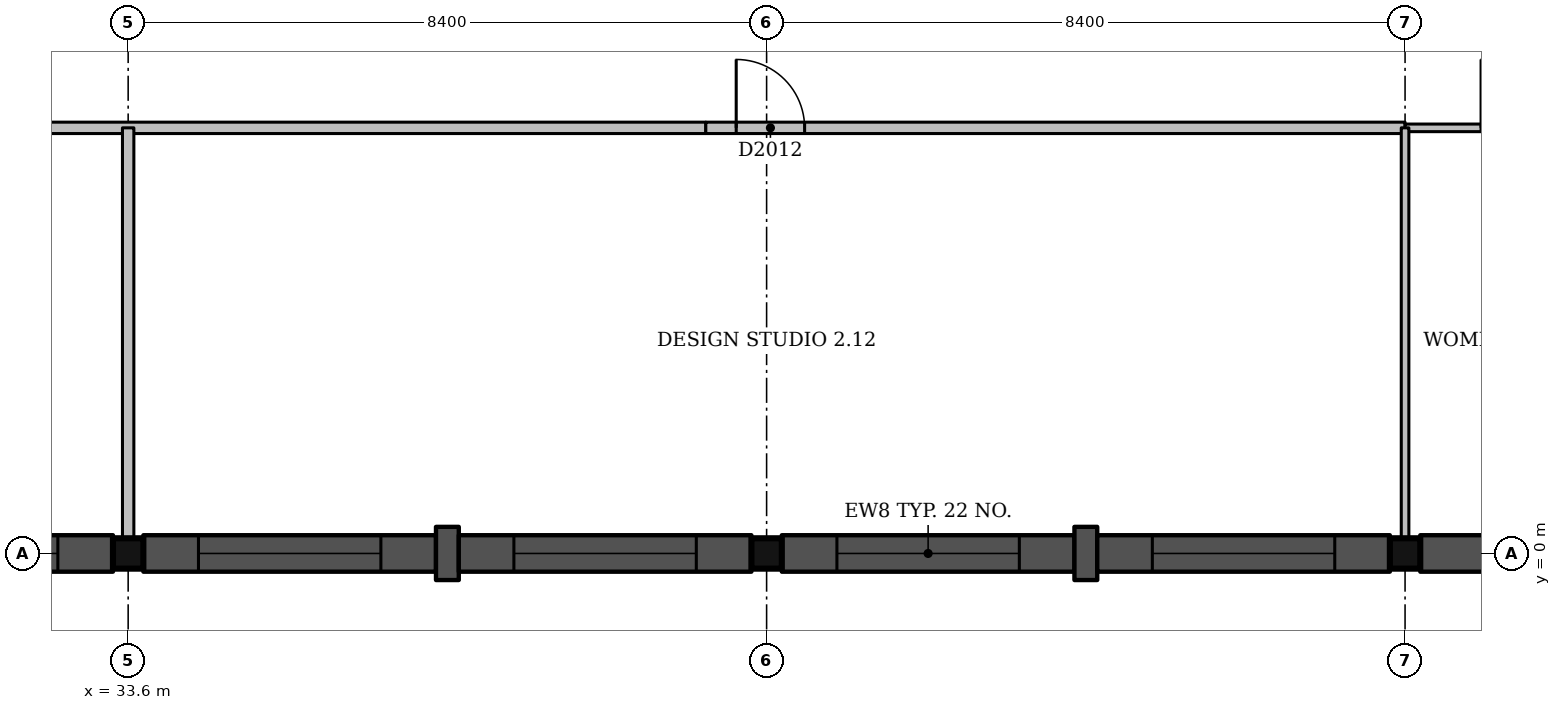
"""IFC4 building model, lengths in metres.
Left out: names, types, materials, properties, quantities, classifications, styles, units other than length and angle.
Written with IfcOpenShell. Run it as: python <this file> out.ifc"""

import sys

from ifc_helpers import new_model, si_unit, direction, frame, frame_2d, origin, origin_2d, place, context, subcontext, project, spatial, rectangle, extrude, element, fill, save


model = new_model("IFC4")
c1 = context("Model", 3, precision=1e-05, world=origin(), true_north=direction((0.0, 1.0)))
c2 = subcontext(c1, "Body", "Model", "MODEL_VIEW")
j1 = project(units=[si_unit("LENGTHUNIT", "METRE"), si_unit("PLANEANGLEUNIT", "RADIAN")], contexts=[c1])
p1 = place(None, origin())
s1 = spatial("IfcSite", under=j1, at=p1, CompositionType="ELEMENT")
p2 = place(p1, origin())
s2 = spatial("IfcBuilding", under=s1, at=p2, CompositionType="ELEMENT")
p3 = place(p2, frame((0.0, 0.0, 9.0)))
s3 = spatial("IfcBuildingStorey", under=s2, at=p3, CompositionType="ELEMENT", Elevation=9.0)
for number, where, z_axis, x_axis in (
    (1, (33.6, 0.0, 0.0), (0.0, 0.0, 1.0), (1.0, 0.0, 0.0)),
    (2, (42.0, 0.0, 0.0), (0.0, 0.0, 1.0), (1.0, 0.0, 0.0)),
    (3, (50.4, 0.0, 0.0), (0.0, 0.0, 1.0), (1.0, 0.0, 0.0)),
):
    element("IfcColumn", number, at=place(p3, frame(where, z_axis=z_axis, x_axis=x_axis)), inside=s3, PredefinedType="COLUMN", context=c2, shape_type="SweptSolid", body=[
        extrude(rectangle(XDim=0.4, YDim=0.4, at=origin_2d()), origin(), (0.0, 0.0, 1.0), 4.5),
    ])
p4 = place(p3, frame((29.55, 0.0, 0.0), z_axis=(0.0, 0.0, 1.0), x_axis=(1.0, 0.0, 0.0)))
e4 = element("IfcWall", 4, at=p4, inside=s3, PredefinedType="SOLIDWALL", context=c2, shape_type="SweptSolid", body=[
    extrude(rectangle(XDim=3.85, YDim=0.48, at=frame_2d((1.925, 0.0))), origin(), (0.0, 0.0, 1.0), 3.6),
])
p5 = place(p4, frame((0.725, 0.0, 2.4)))
e5 = element("IfcOpeningElement", 5, at=p5, cuts=e4, PredefinedType="OPENING", context=c2, shape_type="SweptSolid", body=[
    extrude(rectangle(XDim=2.4, YDim=0.6, at=frame_2d((1.2, 0.3))), frame((0.0, 0.25, 0.0), z_axis=(0.0, -1.0, 0.0), x_axis=(1.0, 0.0, 0.0)), (0.0, 0.0, 1.0), 0.5),
])
p6 = place(p3, frame((33.8, 0.0, 0.0), z_axis=(0.0, 0.0, 1.0), x_axis=(1.0, 0.0, 0.0)))
e6 = element("IfcWall", 6, at=p6, inside=s3, PredefinedType="SOLIDWALL", context=c2, shape_type="SweptSolid", body=[
    extrude(rectangle(XDim=3.85, YDim=0.48, at=frame_2d((1.925, 0.0))), origin(), (0.0, 0.0, 1.0), 3.6),
])
p7 = place(p6, frame((0.725, 0.0, 2.4)))
e7 = element("IfcOpeningElement", 7, at=p7, cuts=e6, PredefinedType="OPENING", context=c2, shape_type="SweptSolid", body=[
    extrude(rectangle(XDim=2.4, YDim=0.6, at=frame_2d((1.2, 0.3))), frame((0.0, 0.25, 0.0), z_axis=(0.0, -1.0, 0.0), x_axis=(1.0, 0.0, 0.0)), (0.0, 0.0, 1.0), 0.5),
])
p8 = place(p3, frame((37.65, 0.0, 0.0), z_axis=(0.0, 0.0, 1.0), x_axis=(1.0, 0.0, 0.0)))
e8 = element("IfcWall", 8, at=p8, inside=s3, PredefinedType="SOLIDWALL", context=c2, shape_type="SweptSolid", body=[
    extrude(rectangle(XDim=0.3, YDim=0.7, at=frame_2d((0.15, 0.0))), origin(), (0.0, 0.0, 1.0), 3.6),
])
p9 = place(p3, frame((37.95, 0.0, 0.0), z_axis=(0.0, 0.0, 1.0), x_axis=(1.0, 0.0, 0.0)))
e9 = element("IfcWall", 9, at=p9, inside=s3, PredefinedType="SOLIDWALL", context=c2, shape_type="SweptSolid", body=[
    extrude(rectangle(XDim=3.85, YDim=0.48, at=frame_2d((1.925, 0.0))), origin(), (0.0, 0.0, 1.0), 3.6),
])
p10 = place(p9, frame((0.725, 0.0, 2.4)))
e10 = element("IfcOpeningElement", 10, at=p10, cuts=e9, PredefinedType="OPENING", context=c2, shape_type="SweptSolid", body=[
    extrude(rectangle(XDim=2.4, YDim=0.6, at=frame_2d((1.2, 0.3))), frame((0.0, 0.25, 0.0), z_axis=(0.0, -1.0, 0.0), x_axis=(1.0, 0.0, 0.0)), (0.0, 0.0, 1.0), 0.5),
])
p11 = place(p3, frame((42.2, 0.0, 0.0), z_axis=(0.0, 0.0, 1.0), x_axis=(1.0, 0.0, 0.0)))
e11 = element("IfcWall", 11, at=p11, inside=s3, PredefinedType="SOLIDWALL", context=c2, shape_type="SweptSolid", body=[
    extrude(rectangle(XDim=3.85, YDim=0.48, at=frame_2d((1.925, 0.0))), origin(), (0.0, 0.0, 1.0), 3.6),
])
p12 = place(p11, frame((0.725, 0.0, 2.4)))
e12 = element("IfcOpeningElement", 12, at=p12, cuts=e11, PredefinedType="OPENING", context=c2, shape_type="SweptSolid", body=[
    extrude(rectangle(XDim=2.4, YDim=0.6, at=frame_2d((1.2, 0.3))), frame((0.0, 0.25, 0.0), z_axis=(0.0, -1.0, 0.0), x_axis=(1.0, 0.0, 0.0)), (0.0, 0.0, 1.0), 0.5),
])
p13 = place(p3, frame((46.05, 0.0, 0.0), z_axis=(0.0, 0.0, 1.0), x_axis=(1.0, 0.0, 0.0)))
e13 = element("IfcWall", 13, at=p13, inside=s3, PredefinedType="SOLIDWALL", context=c2, shape_type="SweptSolid", body=[
    extrude(rectangle(XDim=0.3, YDim=0.7, at=frame_2d((0.15, 0.0))), origin(), (0.0, 0.0, 1.0), 3.6),
])
p14 = place(p3, frame((46.35, 0.0, 0.0), z_axis=(0.0, 0.0, 1.0), x_axis=(1.0, 0.0, 0.0)))
e14 = element("IfcWall", 14, at=p14, inside=s3, PredefinedType="SOLIDWALL", context=c2, shape_type="SweptSolid", body=[
    extrude(rectangle(XDim=3.85, YDim=0.48, at=frame_2d((1.925, 0.0))), origin(), (0.0, 0.0, 1.0), 3.6),
])
p15 = place(p14, frame((0.725, 0.0, 2.4)))
e15 = element("IfcOpeningElement", 15, at=p15, cuts=e14, PredefinedType="OPENING", context=c2, shape_type="SweptSolid", body=[
    extrude(rectangle(XDim=2.4, YDim=0.6, at=frame_2d((1.2, 0.3))), frame((0.0, 0.25, 0.0), z_axis=(0.0, -1.0, 0.0), x_axis=(1.0, 0.0, 0.0)), (0.0, 0.0, 1.0), 0.5),
])
p16 = place(p3, frame((50.6, 0.0, 0.0), z_axis=(0.0, 0.0, 1.0), x_axis=(1.0, 0.0, 0.0)))
e16 = element("IfcWall", 16, at=p16, inside=s3, PredefinedType="SOLIDWALL", context=c2, shape_type="SweptSolid", body=[
    extrude(rectangle(XDim=3.85, YDim=0.48, at=frame_2d((1.925, 0.0))), origin(), (0.0, 0.0, 1.0), 3.6),
])
p17 = place(p16, frame((1.625, 0.0, 1.5)))
e17 = element("IfcOpeningElement", 17, at=p17, cuts=e16, PredefinedType="OPENING", context=c2, shape_type="SweptSolid", body=[
    extrude(rectangle(XDim=0.6, YDim=1.2, at=frame_2d((0.3, 0.6))), frame((0.0, 0.25, 0.0), z_axis=(0.0, -1.0, 0.0), x_axis=(1.0, 0.0, 0.0)), (0.0, 0.0, 1.0), 0.5),
])
p18 = place(p3, frame((11.2, 5.6, 0.0), z_axis=(0.0, 0.0, 1.0), x_axis=(1.0, 0.0, 0.0)))
e18 = element("IfcWall", 18, at=p18, inside=s3, PredefinedType="PARTITIONING", context=c2, shape_type="SweptSolid", body=[
    extrude(rectangle(XDim=30.0, YDim=0.15, at=frame_2d((15.0, 0.0))), origin(), (0.0, 0.0, 1.0), 3.6),
])
p19 = place(p18, frame((2.4, 0.0, 0.0)))
e19 = element("IfcOpeningElement", 19, at=p19, cuts=e18, PredefinedType="OPENING", context=c2, shape_type="SweptSolid", body=[
    extrude(rectangle(XDim=0.9, YDim=2.1, at=frame_2d((0.45, 1.05))), frame((0.0, 0.085, 0.0), z_axis=(0.0, -1.0, 0.0), x_axis=(1.0, 0.0, 0.0)), (0.0, 0.0, 1.0), 0.17),
])
p20 = place(p18, frame((8.0, 0.0, 0.0)))
e20 = element("IfcOpeningElement", 20, at=p20, cuts=e18, PredefinedType="OPENING", context=c2, shape_type="SweptSolid", body=[
    extrude(rectangle(XDim=0.9, YDim=2.1, at=frame_2d((0.45, 1.05))), frame((0.0, 0.085, 0.0), z_axis=(0.0, -1.0, 0.0), x_axis=(1.0, 0.0, 0.0)), (0.0, 0.0, 1.0), 0.17),
])
p21 = place(p18, frame((16.4, 0.0, 0.0)))
e21 = element("IfcOpeningElement", 21, at=p21, cuts=e18, PredefinedType="OPENING", context=c2, shape_type="SweptSolid", body=[
    extrude(rectangle(XDim=0.9, YDim=2.1, at=frame_2d((0.45, 1.05))), frame((0.0, 0.085, 0.0), z_axis=(0.0, -1.0, 0.0), x_axis=(1.0, 0.0, 0.0)), (0.0, 0.0, 1.0), 0.17),
])
p22 = place(p3, frame((41.2, 5.6, 0.0), z_axis=(0.0, 0.0, 1.0), x_axis=(1.0, 0.0, 0.0)))
e22 = element("IfcWall", 22, at=p22, inside=s3, PredefinedType="PARTITIONING", context=c2, shape_type="SweptSolid", body=[
    extrude(rectangle(XDim=9.2, YDim=0.15, at=frame_2d((4.6, 0.0))), origin(), (0.0, 0.0, 1.0), 3.6),
])
p23 = place(p22, frame((0.4, 0.0, 0.0)))
e23 = element("IfcOpeningElement", 23, at=p23, cuts=e22, PredefinedType="OPENING", context=c2, shape_type="SweptSolid", body=[
    extrude(rectangle(XDim=0.9, YDim=2.1, at=frame_2d((0.45, 1.05))), frame((0.0, 0.085, 0.0), z_axis=(0.0, -1.0, 0.0), x_axis=(1.0, 0.0, 0.0)), (0.0, 0.0, 1.0), 0.17),
])
p24 = place(p3, frame((50.4, 5.6, 0.0), z_axis=(0.0, 0.0, 1.0), x_axis=(1.0, 0.0, 0.0)))
e24 = element("IfcWall", 24, at=p24, inside=s3, PredefinedType="PARTITIONING", context=c2, shape_type="SweptSolid", body=[
    extrude(rectangle(XDim=8.4, YDim=0.1, at=frame_2d((4.2, 0.0))), origin(), (0.0, 0.0, 1.0), 3.6),
])
p25 = place(p24, frame((1.0, 0.0, 0.0)))
e25 = element("IfcOpeningElement", 25, at=p25, cuts=e24, PredefinedType="OPENING", context=c2, shape_type="SweptSolid", body=[
    extrude(rectangle(XDim=0.9, YDim=2.1, at=frame_2d((0.45, 1.05))), frame((0.0, 0.06, 0.0), z_axis=(0.0, -1.0, 0.0), x_axis=(1.0, 0.0, 0.0)), (0.0, 0.0, 1.0), 0.12),
])
p26 = place(p24, frame((3.8, 0.0, 0.0)))
e26 = element("IfcOpeningElement", 26, at=p26, cuts=e24, PredefinedType="OPENING", context=c2, shape_type="SweptSolid", body=[
    extrude(rectangle(XDim=0.9, YDim=2.1, at=frame_2d((0.45, 1.05))), frame((0.0, 0.06, 0.0), z_axis=(0.0, -1.0, 0.0), x_axis=(1.0, 0.0, 0.0)), (0.0, 0.0, 1.0), 0.12),
])
p27 = place(p24, frame((6.6, 0.0, 0.0)))
e27 = element("IfcOpeningElement", 27, at=p27, cuts=e24, PredefinedType="OPENING", context=c2, shape_type="SweptSolid", body=[
    extrude(rectangle(XDim=1.0, YDim=2.1, at=frame_2d((0.5, 1.05))), frame((0.0, 0.06, 0.0), z_axis=(0.0, -1.0, 0.0), x_axis=(1.0, 0.0, 0.0)), (0.0, 0.0, 1.0), 0.12),
])
p28 = place(p3, frame((33.6, 0.2, 0.0), z_axis=(0.0, 0.0, 1.0), x_axis=(0.0, 1.0, 0.0)))
e28 = element("IfcWall", 28, at=p28, inside=s3, PredefinedType="PARTITIONING", context=c2, shape_type="SweptSolid", body=[
    extrude(rectangle(XDim=5.4, YDim=0.15, at=frame_2d((2.7, 0.0))), origin(), (0.0, 0.0, 1.0), 3.6),
])
p29 = place(p3, frame((50.4, 0.2, 0.0), z_axis=(0.0, 0.0, 1.0), x_axis=(0.0, 1.0, 0.0)))
e29 = element("IfcWall", 29, at=p29, inside=s3, PredefinedType="PARTITIONING", context=c2, shape_type="SweptSolid", body=[
    extrude(rectangle(XDim=5.4, YDim=0.1, at=frame_2d((2.7, 0.0))), origin(), (0.0, 0.0, 1.0), 3.6),
])
p30 = place(p5, origin())
e30 = element("IfcWindow", 30, at=p30, inside=s3, PartitioningType="SINGLE_PANEL", PredefinedType="WINDOW", context=c2, shape_type="SweptSolid", body=[
    extrude(rectangle(XDim=2.4, YDim=0.6, at=frame_2d((1.2, 0.3))), frame((0.0, 0.12, 0.0), z_axis=(0.0, -1.0, 0.0), x_axis=(1.0, 0.0, 0.0)), (0.0, 0.0, 1.0), 0.06),
])
fill(e5, e30)
p31 = place(p7, origin())
e31 = element("IfcWindow", 31, at=p31, inside=s3, PartitioningType="SINGLE_PANEL", PredefinedType="WINDOW", context=c2, shape_type="SweptSolid", body=[
    extrude(rectangle(XDim=2.4, YDim=0.6, at=frame_2d((1.2, 0.3))), frame((0.0, 0.12, 0.0), z_axis=(0.0, -1.0, 0.0), x_axis=(1.0, 0.0, 0.0)), (0.0, 0.0, 1.0), 0.06),
])
fill(e7, e31)
p32 = place(p10, origin())
e32 = element("IfcWindow", 32, at=p32, inside=s3, PartitioningType="SINGLE_PANEL", PredefinedType="WINDOW", context=c2, shape_type="SweptSolid", body=[
    extrude(rectangle(XDim=2.4, YDim=0.6, at=frame_2d((1.2, 0.3))), frame((0.0, 0.12, 0.0), z_axis=(0.0, -1.0, 0.0), x_axis=(1.0, 0.0, 0.0)), (0.0, 0.0, 1.0), 0.06),
])
fill(e10, e32)
p33 = place(p12, origin())
e33 = element("IfcWindow", 33, at=p33, inside=s3, PartitioningType="SINGLE_PANEL", PredefinedType="WINDOW", context=c2, shape_type="SweptSolid", body=[
    extrude(rectangle(XDim=2.4, YDim=0.6, at=frame_2d((1.2, 0.3))), frame((0.0, 0.12, 0.0), z_axis=(0.0, -1.0, 0.0), x_axis=(1.0, 0.0, 0.0)), (0.0, 0.0, 1.0), 0.06),
])
fill(e12, e33)
p34 = place(p15, origin())
e34 = element("IfcWindow", 34, at=p34, inside=s3, PartitioningType="SINGLE_PANEL", PredefinedType="WINDOW", context=c2, shape_type="SweptSolid", body=[
    extrude(rectangle(XDim=2.4, YDim=0.6, at=frame_2d((1.2, 0.3))), frame((0.0, 0.12, 0.0), z_axis=(0.0, -1.0, 0.0), x_axis=(1.0, 0.0, 0.0)), (0.0, 0.0, 1.0), 0.06),
])
fill(e15, e34)
p35 = place(p23, origin())
e35 = element("IfcDoor", 35, at=p35, inside=s3, OperationType="SINGLE_SWING_LEFT", PredefinedType="DOOR", context=c2, shape_type="SweptSolid", body=[
    extrude(rectangle(XDim=0.9, YDim=2.1, at=frame_2d((0.45, 1.05))), frame((0.0, 0.025, 0.0), z_axis=(0.0, -1.0, 0.0), x_axis=(1.0, 0.0, 0.0)), (0.0, 0.0, 1.0), 0.05),
])
fill(e23, e35)
p36 = place(p25, origin())
e36 = element("IfcDoor", 36, at=p36, inside=s3, OperationType="SINGLE_SWING_LEFT", PredefinedType="DOOR", context=c2, shape_type="SweptSolid", body=[
    extrude(rectangle(XDim=0.9, YDim=2.1, at=frame_2d((0.45, 1.05))), frame((0.0, 0.025, 0.0), z_axis=(0.0, -1.0, 0.0), x_axis=(1.0, 0.0, 0.0)), (0.0, 0.0, 1.0), 0.05),
])
fill(e25, e36)
save(model, sys.argv[1])
